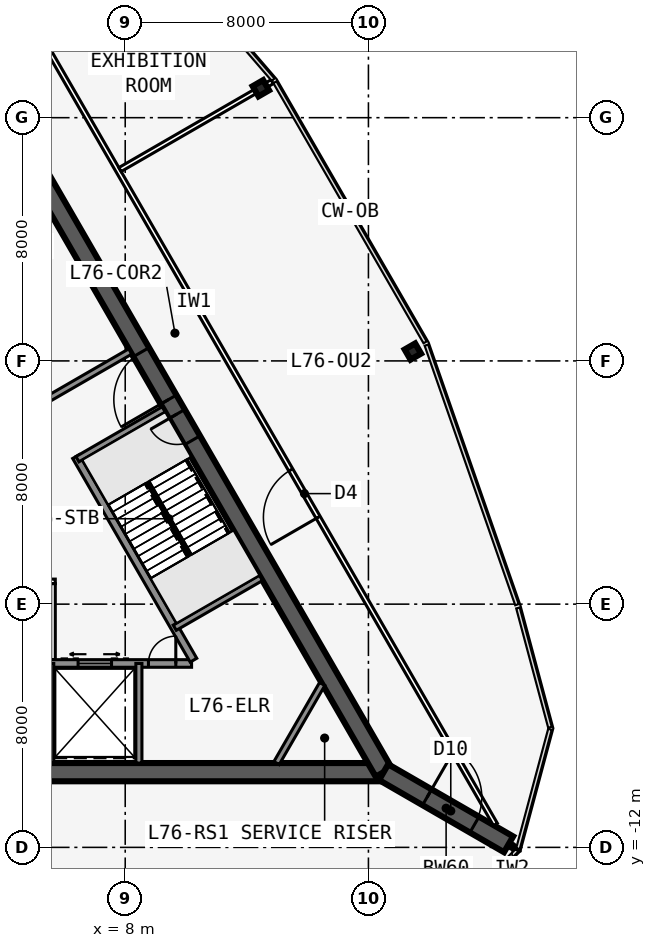
"""IFC4 building model, lengths in metres.
Left out: names, types, materials, properties, quantities, classifications, styles, units other than length and angle.
Written with IfcOpenShell. Run it as: python <this file> out.ifc"""

import sys

from ifc_helpers import new_model, si_unit, direction, frame, frame_2d, origin, origin_2d, place, context, subcontext, project, spatial, rectangle, i_section, extrude, element, fill, save


model = new_model("IFC4")
c1 = context("Model", 3, precision=1e-05, world=origin(), true_north=direction((0.0, 1.0)))
c2 = subcontext(c1, "Body", "Model", "MODEL_VIEW")
j1 = project(units=[si_unit("LENGTHUNIT", "METRE"), si_unit("PLANEANGLEUNIT", "RADIAN")], contexts=[c1])
p1 = place(None, origin())
s1 = spatial("IfcSite", under=j1, at=p1, CompositionType="ELEMENT")
p2 = place(p1, origin())
s2 = spatial("IfcBuilding", under=s1, at=p2, CompositionType="ELEMENT")
p3 = place(p2, frame((0.0, 0.0, 292.8)))
s3 = spatial("IfcBuildingStorey", under=s2, at=p3, CompositionType="ELEMENT", Elevation=292.8)
p4 = place(p3, frame((-16.5, -9.526, 0.0), z_axis=(0.0, 0.0, 1.0), x_axis=(1.0, 0.0, 0.0)))
e1 = element("IfcWall", 1, at=p4, inside=s3, PredefinedType="SHEAR", context=c2, shape_type="SweptSolid", body=[
    extrude(rectangle(XDim=33.0, YDim=0.6, at=frame_2d((16.5, 0.0))), origin(), (0.0, 0.0, 1.0), 5.0),
])
p5 = place(p4, frame((14.05, 0.0, 0.0)))
e2 = element("IfcOpeningElement", 2, at=p5, cuts=e1, PredefinedType="OPENING", context=c2, shape_type="SweptSolid", body=[
    extrude(rectangle(XDim=1.8, YDim=2.13, at=frame_2d((0.9, 1.065))), frame((0.0, 0.31, 0.0), z_axis=(0.0, -1.0, 0.0), x_axis=(1.0, 0.0, 0.0)), (0.0, 0.0, 1.0), 0.62),
])
p6 = place(p3, frame((-0.55, -5.951, 0.0), z_axis=(0.0, 0.0, 1.0), x_axis=(1.0, 0.0, 0.0)))
e3 = element("IfcWall", 3, at=p6, inside=s3, PredefinedType="SOLIDWALL", context=c2, shape_type="SweptSolid", body=[
    extrude(rectangle(XDim=10.733, YDim=0.25, at=frame_2d((5.366, 0.0))), origin(), (0.0, 0.0, 1.0), 4.75),
])
p7 = place(p6, frame((9.314, 0.0, 0.0)))
e4 = element("IfcOpeningElement", 4, at=p7, cuts=e3, PredefinedType="OPENING", context=c2, shape_type="SweptSolid", body=[
    extrude(rectangle(XDim=0.9, YDim=2.13, at=frame_2d((0.45, 1.065))), frame((0.0, 0.135, 0.0), z_axis=(0.0, -1.0, 0.0), x_axis=(1.0, 0.0, 0.0)), (0.0, 0.0, 1.0), 0.27),
])
p8 = place(p6, frame((1.05, 0.0, 0.0)))
e5 = element("IfcOpeningElement", 5, at=p8, cuts=e3, PredefinedType="OPENING", context=c2, shape_type="SweptSolid", body=[
    extrude(rectangle(XDim=1.1, YDim=2.13, at=frame_2d((0.55, 1.065))), frame((0.0, 0.135, 0.0), z_axis=(0.0, -1.0, 0.0), x_axis=(1.0, 0.0, 0.0)), (0.0, 0.0, 1.0), 0.27),
])
p9 = place(p6, frame((4.05, 0.0, 0.0)))
e6 = element("IfcOpeningElement", 6, at=p9, cuts=e3, PredefinedType="OPENING", context=c2, shape_type="SweptSolid", body=[
    extrude(rectangle(XDim=1.1, YDim=2.13, at=frame_2d((0.55, 1.065))), frame((0.0, 0.135, 0.0), z_axis=(0.0, -1.0, 0.0), x_axis=(1.0, 0.0, 0.0)), (0.0, 0.0, 1.0), 0.27),
])
p10 = place(p6, frame((7.0, 0.0, 0.0)))
e7 = element("IfcOpeningElement", 7, at=p10, cuts=e3, PredefinedType="OPENING", context=c2, shape_type="SweptSolid", body=[
    extrude(rectangle(XDim=1.1, YDim=2.13, at=frame_2d((0.55, 1.065))), frame((0.0, 0.135, 0.0), z_axis=(0.0, -1.0, 0.0), x_axis=(1.0, 0.0, 0.0)), (0.0, 0.0, 1.0), 0.27),
])
for number, where, z_axis, x_axis in (
    (8, (5.55, -5.951, 0.0), (0.0, 0.0, 1.0), (0.0, -1.0, 0.0)),
    (9, (8.45, -5.951, 0.0), (0.0, 0.0, 1.0), (0.0, -1.0, 0.0)),
):
    element("IfcWall", number, at=place(p3, frame(where, z_axis=z_axis, x_axis=x_axis)), inside=s3, PredefinedType="SOLIDWALL", context=c2, shape_type="SweptSolid", body=[
        extrude(rectangle(XDim=3.275, YDim=0.2, at=frame_2d((1.637, 0.0))), origin(), (0.0, 0.0, 1.0), 4.75),
    ])
p11 = place(p3, frame((16.5, -9.526, 0.0), z_axis=(0.0, 0.0, 1.0), x_axis=(-0.499999749417, 0.866025548458, 0.0)))
e10 = element("IfcWall", 10, at=p11, inside=s3, PredefinedType="SHEAR", context=c2, shape_type="SweptSolid", body=[
    extrude(rectangle(XDim=33.0, YDim=0.6, at=frame_2d((16.5, 0.0))), origin(), (0.0, 0.0, 1.0), 5.0),
])
p12 = place(p11, frame((14.15, 0.0, 0.0)))
e11 = element("IfcOpeningElement", 11, at=p12, cuts=e10, PredefinedType="OPENING", context=c2, shape_type="SweptSolid", body=[
    extrude(rectangle(XDim=1.8, YDim=2.13, at=frame_2d((0.9, 1.065))), frame((0.0, 0.31, 0.0), z_axis=(0.0, -1.0, 0.0), x_axis=(1.0, 0.0, 0.0)), (0.0, 0.0, 1.0), 0.62),
])
p13 = place(p11, frame((12.6, 0.0, 0.0)))
e12 = element("IfcOpeningElement", 12, at=p13, cuts=e10, PredefinedType="OPENING", context=c2, shape_type="SweptSolid", body=[
    extrude(rectangle(XDim=1.0, YDim=2.13, at=frame_2d((0.5, 1.065))), frame((0.0, 0.31, 0.0), z_axis=(0.0, -1.0, 0.0), x_axis=(1.0, 0.0, 0.0)), (0.0, 0.0, 1.0), 0.62),
])
p14 = place(p3, frame((10.245, -5.843, 0.0), z_axis=(0.0, 0.0, 1.0), x_axis=(-0.499993009313, 0.866029439822, 0.0)))
e13 = element("IfcWall", 13, at=p14, inside=s3, PredefinedType="SOLIDWALL", context=c2, shape_type="SweptSolid", body=[
    extrude(rectangle(XDim=7.733, YDim=0.25, at=frame_2d((3.866, 0.0))), origin(), (0.0, 0.0, 1.0), 4.75),
])
p15 = place(p3, frame((9.629, -4.775, 0.0), z_axis=(0.0, 0.0, 1.0), x_axis=(0.865995643347, 0.500051543047, 0.0)))
e14 = element("IfcWall", 14, at=p15, inside=s3, PredefinedType="SOLIDWALL", context=c2, shape_type="SweptSolid", body=[
    extrude(rectangle(XDim=3.275, YDim=0.2, at=frame_2d((1.638, 0.0))), origin(), (0.0, 0.0, 1.0), 4.75),
])
for number, where, z_axis, x_axis in (
    (15, (6.429, 0.767, 0.0), (0.0, 0.0, 1.0), (0.866, 0.5, 0.0)),
    (16, (5.329, 2.673, 0.0), (0.0, 0.0, 1.0), (0.866, 0.5, 0.0)),
):
    element("IfcWall", number, at=place(p3, frame(where, z_axis=z_axis, x_axis=x_axis)), inside=s3, PredefinedType="SOLIDWALL", context=c2, shape_type="SweptSolid", body=[
        extrude(rectangle(XDim=3.275, YDim=0.2, at=frame_2d((1.637, 0.0))), origin(), (0.0, 0.0, 1.0), 4.75),
    ])
p16 = place(p3, frame((16.5, -9.526, 0.0), z_axis=(0.0, 0.0, 1.0), x_axis=(0.866031398331, -0.499989616998, 0.0)))
e17 = element("IfcWall", 17, at=p16, inside=s3, PredefinedType="SHEAR", context=c2, shape_type="SweptSolid", body=[
    extrude(rectangle(XDim=4.746, YDim=0.6, at=frame_2d((2.373, 0.0))), origin(), (0.0, 0.0, 1.0), 5.0),
])
p17 = place(p16, frame((1.65, 0.0, 0.0)))
e18 = element("IfcOpeningElement", 18, at=p17, cuts=e17, PredefinedType="OPENING", context=c2, shape_type="SweptSolid", body=[
    extrude(rectangle(XDim=1.8, YDim=2.13, at=frame_2d((0.9, 1.065))), frame((0.0, 0.31, 0.0), z_axis=(0.0, -1.0, 0.0), x_axis=(1.0, 0.0, 0.0)), (0.0, 0.0, 1.0), 0.62),
])
for number, where, z_axis, x_axis in (
    (19, (17.461, 4.308, 0.0), (0.0, 0.0, 1.0), (0.866, 0.5, 0.0)),
    (20, (12.461, 12.968, 0.0), (0.0, 0.0, 1.0), (0.866, 0.5, 0.0)),
):
    element("IfcColumn", number, at=place(p3, frame(where, z_axis=z_axis, x_axis=x_axis)), inside=s3, PredefinedType="COLUMN", context=c2, shape_type="SweptSolid", body=[
        extrude(i_section(OverallWidth=0.399, OverallDepth=0.386, WebThickness=0.021, FlangeThickness=0.033, at=origin_2d()), origin(), (0.0, 0.0, 1.0), 5.0),
    ])
p18 = place(p3, frame((20.177, -11.245, 0.0), z_axis=(0.0, 0.0, 1.0), x_axis=(-0.499998875317, 0.866026053119, 0.0)))
e21 = element("IfcWall", 21, at=p18, inside=s3, PredefinedType="PARTITIONING", context=c2, shape_type="SweptSolid", body=[
    extrude(rectangle(XDim=39.654, YDim=0.15, at=frame_2d((19.827, 0.0))), origin(), (0.0, 0.0, 1.0), 4.75),
])
p19 = place(p18, frame((11.664, 0.0, 0.0)))
e22 = element("IfcOpeningElement", 22, at=p19, cuts=e21, PredefinedType="OPENING", context=c2, shape_type="SweptSolid", body=[
    extrude(rectangle(XDim=1.8, YDim=2.13, at=frame_2d((0.9, 1.065))), frame((0.0, 0.085, 0.0), z_axis=(0.0, -1.0, 0.0), x_axis=(1.0, 0.0, 0.0)), (0.0, 0.0, 1.0), 0.17),
])
p20 = place(p18, frame((31.19, 0.0, 0.0)))
e23 = element("IfcOpeningElement", 23, at=p20, cuts=e21, PredefinedType="OPENING", context=c2, shape_type="SweptSolid", body=[
    extrude(rectangle(XDim=1.8, YDim=2.13, at=frame_2d((0.9, 1.065))), frame((0.0, 0.085, 0.0), z_axis=(0.0, -1.0, 0.0), x_axis=(1.0, 0.0, 0.0)), (0.0, 0.0, 1.0), 0.17),
])
p21 = place(p3, frame((7.829, 10.293, 0.0), z_axis=(0.0, 0.0, 1.0), x_axis=(0.866003332883, 0.500038225974, 0.0)))
e24 = element("IfcWall", 24, at=p21, inside=s3, PredefinedType="PARTITIONING", context=c2, shape_type="SweptSolid", body=[
    extrude(rectangle(XDim=5.778, YDim=0.15, at=frame_2d((2.889, 0.0))), origin(), (0.0, 0.0, 1.0), 3.894),
])
p22 = place(p3, frame((20.61, -11.899, 0.0), z_axis=(0.0, 0.0, 1.0), x_axis=(0.866065156741, -0.499931139538, 0.0)))
e25 = element("IfcWall", 25, at=p22, inside=s3, PredefinedType="PARTITIONING", context=c2, shape_type="SweptSolid", body=[
    extrude(rectangle(XDim=0.27, YDim=0.15, at=frame_2d((0.135, 0.0))), origin(), (0.0, 0.0, 1.0), 4.75),
])
p23 = place(p3, frame((-2.65, -3.251, 0.0), z_axis=(0.0, 0.0, 1.0), x_axis=(1.0, 0.0, 0.0)))
e26 = element("IfcWall", 26, at=p23, inside=s3, PredefinedType="PARTITIONING", context=c2, shape_type="SweptSolid", body=[
    extrude(rectangle(XDim=8.35, YDim=0.15, at=frame_2d((4.175, 0.0))), origin(), (0.0, 0.0, 1.0), 4.75),
])
p24 = place(p3, frame((5.625, -5.826, 0.0), z_axis=(0.0, 0.0, 1.0), x_axis=(0.0, 1.0, 0.0)))
e27 = element("IfcWall", 27, at=p24, inside=s3, PredefinedType="PARTITIONING", context=c2, shape_type="SweptSolid", body=[
    extrude(rectangle(XDim=2.5, YDim=0.15, at=frame_2d((1.25, 0.0))), origin(), (0.0, 0.0, 1.0), 4.75),
])
p25 = place(p3, frame((14.479, -6.626, 0.0), z_axis=(0.0, 0.0, 1.0), x_axis=(-0.499952404951, -0.866052881055, 0.0)))
e28 = element("IfcWall", 28, at=p25, inside=s3, PredefinedType="SOLIDWALL", context=c2, shape_type="SweptSolid", body=[
    extrude(rectangle(XDim=3.002, YDim=0.2, at=frame_2d((1.501, 0.0))), origin(), (0.0, 0.0, 1.0), 4.75),
])
p26 = place(p3, frame((10.135, -2.401, 0.0), z_axis=(0.0, 0.0, 1.0), x_axis=(-0.499992232847, 0.866029888106, 0.0)))
e29 = element("IfcWall", 29, at=p26, inside=s3, PredefinedType="SOLIDWALL", context=c2, shape_type="SweptSolid", body=[
    extrude(rectangle(XDim=2.794, YDim=0.1, at=frame_2d((1.397, 0.0))), origin(), (0.0, 0.0, 1.0), 5.0),
])
p27 = place(p19, origin())
e30 = element("IfcDoor", 30, at=p27, inside=s3, OperationType="DOUBLE_DOOR_SINGLE_SWING", PredefinedType="DOOR", context=c2, shape_type="SweptSolid", body=[
    extrude(rectangle(XDim=1.8, YDim=2.13, at=frame_2d((0.9, 1.065))), frame((0.0, 0.025, 0.0), z_axis=(0.0, -1.0, 0.0), x_axis=(1.0, 0.0, 0.0)), (0.0, 0.0, 1.0), 0.05),
])
fill(e22, e30)
p28 = place(p12, origin())
e31 = element("IfcDoor", 31, at=p28, inside=s3, OperationType="DOUBLE_DOOR_SINGLE_SWING", PredefinedType="DOOR", context=c2, shape_type="SweptSolid", body=[
    extrude(rectangle(XDim=1.8, YDim=2.13, at=frame_2d((0.9, 1.065))), frame((0.0, 0.025, 0.0), z_axis=(0.0, -1.0, 0.0), x_axis=(1.0, 0.0, 0.0)), (0.0, 0.0, 1.0), 0.05),
])
fill(e11, e31)
p29 = place(p13, origin())
e32 = element("IfcDoor", 32, at=p29, inside=s3, OperationType="SINGLE_SWING_RIGHT", PredefinedType="DOOR", context=c2, shape_type="SweptSolid", body=[
    extrude(rectangle(XDim=1.0, YDim=2.13, at=frame_2d((0.5, 1.065))), frame((0.0, 0.025, 0.0), z_axis=(0.0, -1.0, 0.0), x_axis=(1.0, 0.0, 0.0)), (0.0, 0.0, 1.0), 0.05),
])
fill(e12, e32)
p30 = place(p17, origin())
e33 = element("IfcDoor", 33, at=p30, inside=s3, OperationType="DOUBLE_DOOR_DOUBLE_SWING", PredefinedType="DOOR", context=c2, shape_type="SweptSolid", body=[
    extrude(rectangle(XDim=1.8, YDim=2.13, at=frame_2d((0.9, 1.065))), frame((0.0, 0.025, 0.0), z_axis=(0.0, -1.0, 0.0), x_axis=(1.0, 0.0, 0.0)), (0.0, 0.0, 1.0), 0.05),
])
fill(e18, e33)
p31 = place(p7, origin())
e34 = element("IfcDoor", 34, at=p31, inside=s3, OperationType="SINGLE_SWING_RIGHT", PredefinedType="DOOR", context=c2, shape_type="SweptSolid", body=[
    extrude(rectangle(XDim=0.9, YDim=2.13, at=frame_2d((0.45, 1.065))), frame((0.0, 0.025, 0.0), z_axis=(0.0, -1.0, 0.0), x_axis=(1.0, 0.0, 0.0)), (0.0, 0.0, 1.0), 0.05),
])
fill(e4, e34)
p32 = place(p10, origin())
e35 = element("IfcDoor", 35, at=p32, inside=s3, OperationType="DOUBLE_DOOR_SLIDING", PredefinedType="USERDEFINED", context=c2, shape_type="SweptSolid", body=[
    extrude(rectangle(XDim=1.1, YDim=2.13, at=frame_2d((0.55, 1.065))), frame((0.0, 0.025, 0.0), z_axis=(0.0, -1.0, 0.0), x_axis=(1.0, 0.0, 0.0)), (0.0, 0.0, 1.0), 0.05),
])
fill(e7, e35)
save(model, sys.argv[1])
